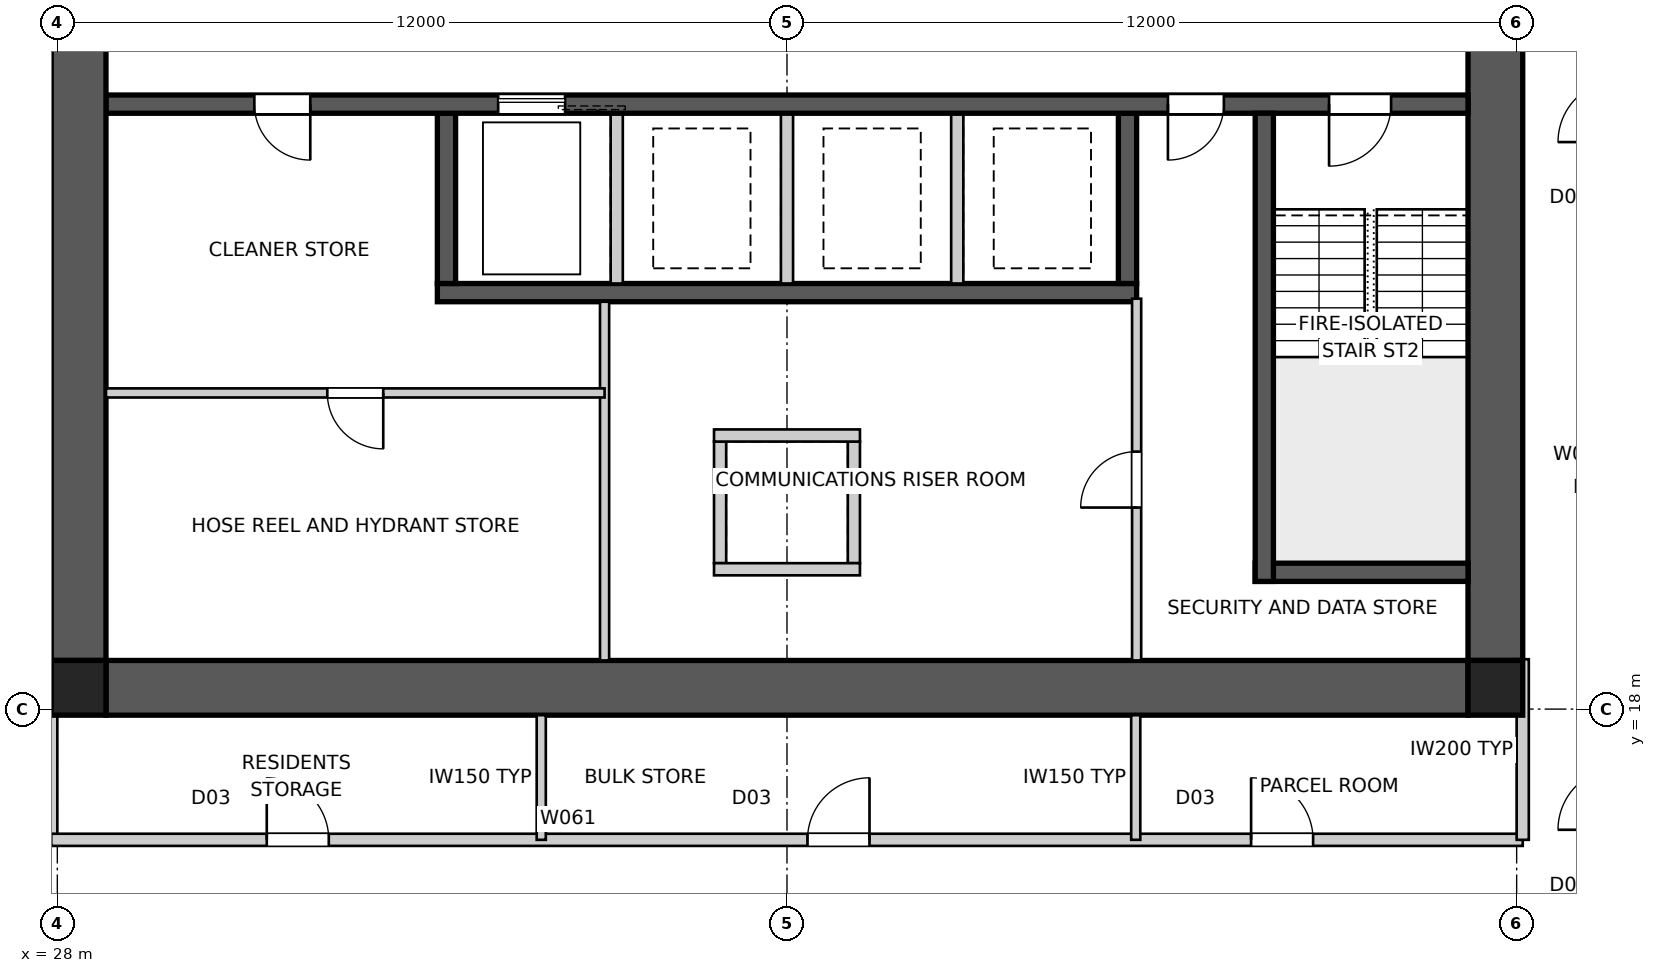
"""IFC4 building model, lengths in metres.
Left out: names, types, materials, properties, quantities, classifications, styles, units other than length and angle.
Written with IfcOpenShell. Run it as: python <this file> out.ifc"""

import sys

from ifc_helpers import new_model, si_unit, direction, frame, frame_2d, origin, origin_2d, place, context, subcontext, project, spatial, polyline, rectangle, outline, extrude, element, fill, save


model = new_model("IFC4")
c1 = context("Model", 3, precision=1e-05, world=origin(), true_north=direction((0.0, 1.0)))
c2 = subcontext(c1, "Body", "Model", "MODEL_VIEW")
j1 = project(units=[si_unit("LENGTHUNIT", "METRE"), si_unit("PLANEANGLEUNIT", "RADIAN")], contexts=[c1])
p1 = place(None, origin())
s1 = spatial("IfcSite", under=j1, at=p1, CompositionType="ELEMENT")
p2 = place(p1, origin())
s2 = spatial("IfcBuilding", under=s1, at=p2, CompositionType="ELEMENT")
p3 = place(p2, frame((0.0, 0.0, 28.6)))
s3 = spatial("IfcBuildingStorey", under=s2, at=p3, CompositionType="ELEMENT", Elevation=28.6)
p4 = place(p3, frame((51.2, 18.35, 0.0), z_axis=(0.0, 0.0, 1.0), x_axis=(-1.0, 0.0, 0.0)))
e1 = element("IfcWall", 1, at=p4, inside=s3, PredefinedType="SHEAR", context=c2, shape_type="SweptSolid", body=[
    extrude(outline(polyline([(0.0, -0.45), (22.4, -0.45), (22.4, -0.025), (22.85, -0.025), (22.85, 0.025), (22.4, 0.025), (22.4, 0.45), (0.0, 0.45), (0.0, 0.025), (-0.45, 0.025), (-0.45, -0.025), (0.0, -0.025), (0.0, -0.45)])), origin(), (0.0, 0.0, 1.0), 3.4),
])
p5 = place(p3, frame((51.65, 18.8, 0.0), z_axis=(0.0, 0.0, 1.0), x_axis=(0.0, 1.0, 0.0)))
e2 = element("IfcWall", 2, at=p5, inside=s3, PredefinedType="SHEAR", context=c2, shape_type="SweptSolid", body=[
    extrude(outline(polyline([(0.0, -0.45), (22.4, -0.45), (22.4, -0.025), (22.85, -0.025), (22.85, 0.025), (22.4, 0.025), (22.4, 0.45), (0.0, 0.45), (0.0, 0.025), (-0.45, 0.025), (-0.45, -0.025), (0.0, -0.025), (0.0, -0.45)])), origin(), (0.0, 0.0, 1.0), 3.4),
])
p6 = place(p5, frame((11.14, 0.0, 0.0)))
e3 = element("IfcOpeningElement", 3, at=p6, cuts=e2, PredefinedType="OPENING", context=c2, shape_type="SweptSolid", body=[
    extrude(rectangle(XDim=1.02, YDim=2.4, at=frame_2d((0.51, 1.2))), frame((0.0, 0.46, 0.0), z_axis=(0.0, -1.0, 0.0), x_axis=(1.0, 0.0, 0.0)), (0.0, 0.0, 1.0), 0.92),
])
p7 = place(p3, frame((28.35, 41.2, 0.0), z_axis=(0.0, 0.0, 1.0), x_axis=(0.0, -1.0, 0.0)))
e4 = element("IfcWall", 4, at=p7, inside=s3, PredefinedType="SHEAR", context=c2, shape_type="SweptSolid", body=[
    extrude(outline(polyline([(0.0, -0.45), (22.4, -0.45), (22.4, -0.025), (22.85, -0.025), (22.85, 0.025), (22.4, 0.025), (22.4, 0.45), (0.0, 0.45), (0.0, 0.025), (-0.45, 0.025), (-0.45, -0.025), (0.0, -0.025), (0.0, -0.45)])), origin(), (0.0, 0.0, 1.0), 3.4),
])
p8 = place(p7, frame((11.14, 0.0, 0.0)))
e5 = element("IfcOpeningElement", 5, at=p8, cuts=e4, PredefinedType="OPENING", context=c2, shape_type="SweptSolid", body=[
    extrude(rectangle(XDim=1.02, YDim=2.4, at=frame_2d((0.51, 1.2))), frame((0.0, 0.46, 0.0), z_axis=(0.0, -1.0, 0.0), x_axis=(1.0, 0.0, 0.0)), (0.0, 0.0, 1.0), 0.92),
])
p9 = place(p3, frame((51.2, 27.95, 0.0), z_axis=(0.0, 0.0, 1.0), x_axis=(-1.0, 0.0, 0.0)))
e6 = element("IfcWall", 6, at=p9, inside=s3, PredefinedType="SHEAR", context=c2, shape_type="SweptSolid", body=[
    extrude(rectangle(XDim=22.4, YDim=0.3, at=frame_2d((11.2, 0.0))), origin(), (0.0, 0.0, 1.0), 3.4),
])
p10 = place(p9, frame((19.04, 0.0, 0.0)))
e7 = element("IfcOpeningElement", 7, at=p10, cuts=e6, PredefinedType="OPENING", context=c2, shape_type="SweptSolid", body=[
    extrude(rectangle(XDim=0.92, YDim=2.1, at=frame_2d((0.46, 1.05))), frame((0.0, 0.16, 0.0), z_axis=(0.0, -1.0, 0.0), x_axis=(1.0, 0.0, 0.0)), (0.0, 0.0, 1.0), 0.32),
])
p11 = place(p9, frame((1.265, 0.0, 0.0)))
e8 = element("IfcOpeningElement", 8, at=p11, cuts=e6, PredefinedType="OPENING", context=c2, shape_type="SweptSolid", body=[
    extrude(rectangle(XDim=1.02, YDim=2.1, at=frame_2d((0.51, 1.05))), frame((0.0, 0.16, 0.0), z_axis=(0.0, -1.0, 0.0), x_axis=(1.0, 0.0, 0.0)), (0.0, 0.0, 1.0), 0.32),
])
p12 = place(p9, frame((4.015, 0.0, 0.0)))
e9 = element("IfcOpeningElement", 9, at=p12, cuts=e6, PredefinedType="OPENING", context=c2, shape_type="SweptSolid", body=[
    extrude(rectangle(XDim=0.92, YDim=2.1, at=frame_2d((0.46, 1.05))), frame((0.0, 0.16, 0.0), z_axis=(0.0, -1.0, 0.0), x_axis=(1.0, 0.0, 0.0)), (0.0, 0.0, 1.0), 0.32),
])
p13 = place(p9, frame((14.85, 0.0, 0.0)))
e10 = element("IfcOpeningElement", 10, at=p13, cuts=e6, PredefinedType="OPENING", context=c2, shape_type="SweptSolid", body=[
    extrude(rectangle(XDim=1.1, YDim=2.1, at=frame_2d((0.55, 1.05))), frame((0.0, 0.16, 0.0), z_axis=(0.0, -1.0, 0.0), x_axis=(1.0, 0.0, 0.0)), (0.0, 0.0, 1.0), 0.32),
])
p14 = place(p3, frame((45.75, 24.85, 0.0), z_axis=(0.0, 0.0, 1.0), x_axis=(-1.0, 0.0, 0.0)))
e11 = element("IfcWall", 11, at=p14, inside=s3, PredefinedType="SHEAR", context=c2, shape_type="SweptSolid", body=[
    extrude(rectangle(XDim=11.5, YDim=0.3, at=frame_2d((5.75, 0.0))), origin(), (0.0, 0.0, 1.0), 3.4),
])
p15 = place(p3, frame((45.6, 27.8, 0.0), z_axis=(0.0, 0.0, 1.0), x_axis=(0.0, -1.0, 0.0)))
e12 = element("IfcWall", 12, at=p15, inside=s3, PredefinedType="SHEAR", context=c2, shape_type="SweptSolid", body=[
    extrude(rectangle(XDim=2.8, YDim=0.3, at=frame_2d((1.4, 0.0))), origin(), (0.0, 0.0, 1.0), 3.4),
])
for number, where, z_axis, x_axis in (
    (13, (42.8, 27.8, 0.0), (0.0, 0.0, 1.0), (0.0, -1.0, 0.0)),
    (14, (40.0, 27.8, 0.0), (0.0, 0.0, 1.0), (0.0, -1.0, 0.0)),
    (15, (37.2, 27.8, 0.0), (0.0, 0.0, 1.0), (0.0, -1.0, 0.0)),
):
    element("IfcWall", number, at=place(p3, frame(where, z_axis=z_axis, x_axis=x_axis)), inside=s3, PredefinedType="SOLIDWALL", context=c2, shape_type="SweptSolid", body=[
        extrude(rectangle(XDim=2.8, YDim=0.2, at=frame_2d((1.4, 0.0))), origin(), (0.0, 0.0, 1.0), 3.4),
    ])
p16 = place(p3, frame((34.4, 27.8, 0.0), z_axis=(0.0, 0.0, 1.0), x_axis=(0.0, -1.0, 0.0)))
e16 = element("IfcWall", 16, at=p16, inside=s3, PredefinedType="SHEAR", context=c2, shape_type="SweptSolid", body=[
    extrude(rectangle(XDim=2.8, YDim=0.3, at=frame_2d((1.4, 0.0))), origin(), (0.0, 0.0, 1.0), 3.4),
])
p17 = place(p3, frame((47.85, 27.8, 0.0), z_axis=(0.0, 0.0, 1.0), x_axis=(0.0, -1.0, 0.0)))
e17 = element("IfcWall", 17, at=p17, inside=s3, PredefinedType="SHEAR", context=c2, shape_type="SweptSolid", body=[
    extrude(rectangle(XDim=7.7, YDim=0.3, at=frame_2d((3.85, 0.0))), origin(), (0.0, 0.0, 1.0), 3.4),
])
p18 = place(p3, frame((51.2, 20.25, 0.0), z_axis=(0.0, 0.0, 1.0), x_axis=(-1.0, 0.0, 0.0)))
e18 = element("IfcWall", 18, at=p18, inside=s3, PredefinedType="SHEAR", context=c2, shape_type="SweptSolid", body=[
    extrude(rectangle(XDim=3.5, YDim=0.3, at=frame_2d((1.75, 0.0))), origin(), (0.0, 0.0, 1.0), 3.4),
])
for number, where, z_axis, x_axis in (
    (19, (38.9, 22.4, 0.0), (0.0, 0.0, 1.0), (0.0, -1.0, 0.0)),
    (20, (41.1, 22.4, 0.0), (0.0, 0.0, 1.0), (0.0, -1.0, 0.0)),
):
    element("IfcWall", number, at=place(p3, frame(where, z_axis=z_axis, x_axis=x_axis)), inside=s3, PredefinedType="SOLIDWALL", context=c2, shape_type="SweptSolid", body=[
        extrude(rectangle(XDim=2.0, YDim=0.2, at=frame_2d((1.0, 0.0))), origin(), (0.0, 0.0, 1.0), 3.4),
    ])
for number, where, z_axis, x_axis in (
    (21, (38.8, 22.5, 0.0), (0.0, 0.0, 1.0), (1.0, 0.0, 0.0)),
    (22, (38.8, 20.3, 0.0), (0.0, 0.0, 1.0), (1.0, 0.0, 0.0)),
):
    element("IfcWall", number, at=place(p3, frame(where, z_axis=z_axis, x_axis=x_axis)), inside=s3, PredefinedType="SOLIDWALL", context=c2, shape_type="SweptSolid", body=[
        extrude(rectangle(XDim=2.4, YDim=0.2, at=frame_2d((1.2, 0.0))), origin(), (0.0, 0.0, 1.0), 3.4),
    ])
for number, where, z_axis, x_axis in (
    (23, (28.35, 18.35, 0.0), (0.0, 0.0, 1.0), (1.0, 0.0, 0.0)),
    (24, (51.65, 18.35, 0.0), (0.0, 0.0, 1.0), (1.0, 0.0, 0.0)),
):
    element("IfcColumn", number, at=place(p3, frame(where, z_axis=z_axis, x_axis=x_axis)), inside=s3, PredefinedType="COLUMN", context=c2, shape_type="SweptSolid", body=[
        extrude(rectangle(XDim=0.9, YDim=0.9, at=origin_2d()), origin(), (0.0, 0.0, 1.0), 3.4),
    ])
p19 = place(p3, frame((45.75, 18.8, 0.0), z_axis=(0.0, 0.0, 1.0), x_axis=(0.0, 1.0, 0.0)))
e25 = element("IfcWall", 25, at=p19, inside=s3, PredefinedType="SOLIDWALL", context=c2, shape_type="SweptSolid", body=[
    extrude(rectangle(XDim=5.95, YDim=0.15, at=frame_2d((2.975, 0.0))), origin(), (0.0, 0.0, 1.0), 3.25),
])
p20 = place(p19, frame((2.515, 0.0, 0.0)))
e26 = element("IfcOpeningElement", 26, at=p20, cuts=e25, PredefinedType="OPENING", context=c2, shape_type="SweptSolid", body=[
    extrude(rectangle(XDim=0.92, YDim=2.1, at=frame_2d((0.46, 1.05))), frame((0.0, 0.085, 0.0), z_axis=(0.0, -1.0, 0.0), x_axis=(1.0, 0.0, 0.0)), (0.0, 0.0, 1.0), 0.17),
])
p21 = place(p3, frame((37.0, 18.8, 0.0), z_axis=(0.0, 0.0, 1.0), x_axis=(0.0, 1.0, 0.0)))
e27 = element("IfcWall", 27, at=p21, inside=s3, PredefinedType="SOLIDWALL", context=c2, shape_type="SweptSolid", body=[
    extrude(rectangle(XDim=5.9, YDim=0.15, at=frame_2d((2.95, 0.0))), origin(), (0.0, 0.0, 1.0), 3.25),
])
p22 = place(p3, frame((37.0, 23.2, 0.0), z_axis=(0.0, 0.0, 1.0), x_axis=(-1.0, 0.0, 0.0)))
e28 = element("IfcWall", 28, at=p22, inside=s3, PredefinedType="SOLIDWALL", context=c2, shape_type="SweptSolid", body=[
    extrude(rectangle(XDim=8.2, YDim=0.15, at=frame_2d((4.1, 0.0))), origin(), (0.0, 0.0, 1.0), 3.25),
])
p23 = place(p22, frame((3.64, 0.0, 0.0)))
e29 = element("IfcOpeningElement", 29, at=p23, cuts=e28, PredefinedType="OPENING", context=c2, shape_type="SweptSolid", body=[
    extrude(rectangle(XDim=0.92, YDim=2.1, at=frame_2d((0.46, 1.05))), frame((0.0, 0.085, 0.0), z_axis=(0.0, -1.0, 0.0), x_axis=(1.0, 0.0, 0.0)), (0.0, 0.0, 1.0), 0.17),
])
p24 = place(p3, frame((27.9, 17.95, 0.0), z_axis=(0.0, 0.0, 1.0), x_axis=(0.0, -1.0, 0.0)))
e30 = element("IfcWall", 30, at=p24, inside=s3, PredefinedType="PARTITIONING", context=c2, shape_type="SweptSolid", body=[
    extrude(rectangle(XDim=2.1, YDim=0.2, at=frame_2d((1.05, 0.0))), origin(), (0.0, 0.0, 1.0), 3.25),
])
p25 = place(p3, frame((27.9, 15.85, 0.0), z_axis=(0.0, 0.0, 1.0), x_axis=(1.0, 0.0, 0.0)))
e31 = element("IfcWall", 31, at=p25, inside=s3, PredefinedType="PARTITIONING", context=c2, shape_type="SweptSolid", body=[
    extrude(rectangle(XDim=24.2, YDim=0.2, at=frame_2d((12.1, 0.0))), origin(), (0.0, 0.0, 1.0), 3.25),
])
p26 = place(p25, frame((12.437, 0.0, 0.0)))
e32 = element("IfcOpeningElement", 32, at=p26, cuts=e31, PredefinedType="OPENING", context=c2, shape_type="SweptSolid", body=[
    extrude(rectangle(XDim=1.02, YDim=2.1, at=frame_2d((0.51, 1.05))), frame((0.0, 0.11, 0.0), z_axis=(0.0, -1.0, 0.0), x_axis=(1.0, 0.0, 0.0)), (0.0, 0.0, 1.0), 0.22),
])
p27 = place(p25, frame((3.544, 0.0, 0.0)))
e33 = element("IfcOpeningElement", 33, at=p27, cuts=e31, PredefinedType="OPENING", context=c2, shape_type="SweptSolid", body=[
    extrude(rectangle(XDim=1.02, YDim=2.1, at=frame_2d((0.51, 1.05))), frame((0.0, 0.11, 0.0), z_axis=(0.0, -1.0, 0.0), x_axis=(1.0, 0.0, 0.0)), (0.0, 0.0, 1.0), 0.22),
])
p28 = place(p25, frame((19.733, 0.0, 0.0)))
e34 = element("IfcOpeningElement", 34, at=p28, cuts=e31, PredefinedType="OPENING", context=c2, shape_type="SweptSolid", body=[
    extrude(rectangle(XDim=1.02, YDim=2.1, at=frame_2d((0.51, 1.05))), frame((0.0, 0.11, 0.0), z_axis=(0.0, -1.0, 0.0), x_axis=(1.0, 0.0, 0.0)), (0.0, 0.0, 1.0), 0.22),
])
p29 = place(p3, frame((52.1, 15.85, 0.0), z_axis=(0.0, 0.0, 1.0), x_axis=(0.0, 1.0, 0.0)))
e35 = element("IfcWall", 35, at=p29, inside=s3, PredefinedType="PARTITIONING", context=c2, shape_type="SweptSolid", body=[
    extrude(rectangle(XDim=2.97, YDim=0.2, at=frame_2d((1.485, 0.0))), origin(), (0.0, 0.0, 1.0), 3.25),
])
p30 = place(p3, frame((35.958, 15.85, 0.0), z_axis=(0.0, 0.0, 1.0), x_axis=(0.0, 1.0, 0.0)))
e36 = element("IfcWall", 36, at=p30, inside=s3, PredefinedType="SOLIDWALL", context=c2, shape_type="SweptSolid", body=[
    extrude(rectangle(XDim=2.05, YDim=0.15, at=frame_2d((1.025, 0.0))), origin(), (0.0, 0.0, 1.0), 3.25),
])
p31 = place(p3, frame((45.735, 15.85, 0.0), z_axis=(0.0, 0.0, 1.0), x_axis=(0.0, 1.0, 0.0)))
e37 = element("IfcWall", 37, at=p31, inside=s3, PredefinedType="SOLIDWALL", context=c2, shape_type="SweptSolid", body=[
    extrude(rectangle(XDim=2.05, YDim=0.15, at=frame_2d((1.025, 0.0))), origin(), (0.0, 0.0, 1.0), 2.796),
])
p32 = place(p10, origin())
e38 = element("IfcDoor", 38, at=p32, inside=s3, OperationType="SINGLE_SWING_LEFT", PredefinedType="DOOR", context=c2, shape_type="SweptSolid", body=[
    extrude(rectangle(XDim=0.92, YDim=2.1, at=frame_2d((0.46, 1.05))), frame((0.0, 0.025, 0.0), z_axis=(0.0, -1.0, 0.0), x_axis=(1.0, 0.0, 0.0)), (0.0, 0.0, 1.0), 0.05),
])
fill(e7, e38)
p33 = place(p11, origin())
e39 = element("IfcDoor", 39, at=p33, inside=s3, OperationType="SINGLE_SWING_RIGHT", PredefinedType="DOOR", context=c2, shape_type="SweptSolid", body=[
    extrude(rectangle(XDim=1.02, YDim=2.1, at=frame_2d((0.51, 1.05))), frame((0.0, 0.025, 0.0), z_axis=(0.0, -1.0, 0.0), x_axis=(1.0, 0.0, 0.0)), (0.0, 0.0, 1.0), 0.05),
])
fill(e8, e39)
p34 = place(p12, origin())
e40 = element("IfcDoor", 40, at=p34, inside=s3, OperationType="SINGLE_SWING_RIGHT", PredefinedType="DOOR", context=c2, shape_type="SweptSolid", body=[
    extrude(rectangle(XDim=0.92, YDim=2.1, at=frame_2d((0.46, 1.05))), frame((0.0, 0.025, 0.0), z_axis=(0.0, -1.0, 0.0), x_axis=(1.0, 0.0, 0.0)), (0.0, 0.0, 1.0), 0.05),
])
fill(e9, e40)
p35 = place(p26, origin())
e41 = element("IfcDoor", 41, at=p35, inside=s3, OperationType="SINGLE_SWING_RIGHT", PredefinedType="DOOR", context=c2, shape_type="SweptSolid", body=[
    extrude(rectangle(XDim=1.02, YDim=2.1, at=frame_2d((0.51, 1.05))), frame((0.0, 0.025, 0.0), z_axis=(0.0, -1.0, 0.0), x_axis=(1.0, 0.0, 0.0)), (0.0, 0.0, 1.0), 0.05),
])
fill(e32, e41)
p36 = place(p27, origin())
e42 = element("IfcDoor", 42, at=p36, inside=s3, OperationType="SINGLE_SWING_LEFT", PredefinedType="DOOR", context=c2, shape_type="SweptSolid", body=[
    extrude(rectangle(XDim=1.02, YDim=2.1, at=frame_2d((0.51, 1.05))), frame((0.0, 0.025, 0.0), z_axis=(0.0, -1.0, 0.0), x_axis=(1.0, 0.0, 0.0)), (0.0, 0.0, 1.0), 0.05),
])
fill(e33, e42)
p37 = place(p28, origin())
e43 = element("IfcDoor", 43, at=p37, inside=s3, OperationType="SINGLE_SWING_LEFT", PredefinedType="DOOR", context=c2, shape_type="SweptSolid", body=[
    extrude(rectangle(XDim=1.02, YDim=2.1, at=frame_2d((0.51, 1.05))), frame((0.0, 0.025, 0.0), z_axis=(0.0, -1.0, 0.0), x_axis=(1.0, 0.0, 0.0)), (0.0, 0.0, 1.0), 0.05),
])
fill(e34, e43)
p38 = place(p23, origin())
e44 = element("IfcDoor", 44, at=p38, inside=s3, OperationType="SINGLE_SWING_LEFT", PredefinedType="DOOR", context=c2, shape_type="SweptSolid", body=[
    extrude(rectangle(XDim=0.92, YDim=2.1, at=frame_2d((0.46, 1.05))), frame((0.0, 0.025, 0.0), z_axis=(0.0, -1.0, 0.0), x_axis=(1.0, 0.0, 0.0)), (0.0, 0.0, 1.0), 0.05),
])
fill(e29, e44)
p39 = place(p20, origin())
e45 = element("IfcDoor", 45, at=p39, inside=s3, OperationType="SINGLE_SWING_LEFT", PredefinedType="DOOR", context=c2, shape_type="SweptSolid", body=[
    extrude(rectangle(XDim=0.92, YDim=2.1, at=frame_2d((0.46, 1.05))), frame((0.0, 0.025, 0.0), z_axis=(0.0, -1.0, 0.0), x_axis=(1.0, 0.0, 0.0)), (0.0, 0.0, 1.0), 0.05),
])
fill(e26, e45)
p40 = place(p13, origin())
e46 = element("IfcDoor", 46, at=p40, inside=s3, OperationType="SLIDING_TO_LEFT", PredefinedType="DOOR", context=c2, shape_type="SweptSolid", body=[
    extrude(rectangle(XDim=1.1, YDim=2.1, at=frame_2d((0.55, 1.05))), frame((0.0, 0.025, 0.0), z_axis=(0.0, -1.0, 0.0), x_axis=(1.0, 0.0, 0.0)), (0.0, 0.0, 1.0), 0.05),
])
fill(e10, e46)
save(model, sys.argv[1])
